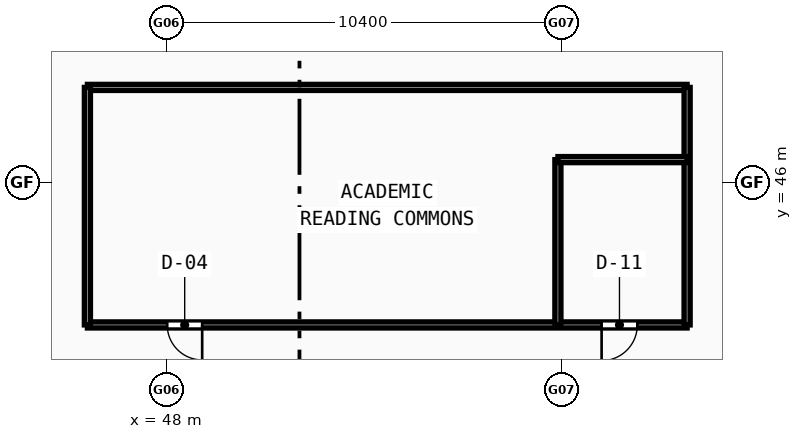
"""IFC4 building model, lengths in metres.
Left out: names, types, materials, properties, quantities, classifications, styles, units other than length and angle.
Written with IfcOpenShell. Run it as: python <this file> out.ifc"""

import sys

from ifc_helpers import new_model, si_unit, direction, frame, frame_2d, origin, place, context, subcontext, project, spatial, rectangle, extrude, source, transform, mapped, element, fill, save


model = new_model("IFC4")
c1 = context("Model", 3, precision=1e-05, world=origin(), true_north=direction((0.0, 1.0)))
c2 = subcontext(c1, "Body", "Model", "MODEL_VIEW")
j1 = project(units=[si_unit("LENGTHUNIT", "METRE"), si_unit("PLANEANGLEUNIT", "RADIAN")], contexts=[c1])
p1 = place(None, origin())
s1 = spatial("IfcSite", under=j1, at=p1, CompositionType="ELEMENT")
p2 = place(p1, origin())
s2 = spatial("IfcBuilding", under=s1, at=p2, CompositionType="ELEMENT")
p3 = place(p2, frame((0.0, 0.0, 34.03)))
s3 = spatial("IfcBuildingStorey", under=s2, at=p3, CompositionType="ELEMENT", Elevation=34.03)
p4 = place(p3, frame((45.92, 42.25, 0.0), z_axis=(0.0, 0.0, 1.0), x_axis=(1.0, 0.0, 0.0)))
e1 = element("IfcWall", 1, at=p4, inside=s3, PredefinedType="PARTITIONING", context=c2, shape_type="SweptSolid", body=[
    extrude(rectangle(XDim=15.78, YDim=0.16, at=frame_2d((7.89, 0.0))), origin(), (0.0, 0.0, 1.0), 2.67),
])
p5 = place(p4, frame((2.1, 0.0, 0.0)))
e2 = element("IfcOpeningElement", 2, at=p5, cuts=e1, PredefinedType="OPENING", context=c2, shape_type="SweptSolid", body=[
    extrude(rectangle(XDim=0.92, YDim=2.1, at=frame_2d((0.46, 1.05))), frame((0.0, 0.09, 0.0), z_axis=(0.0, -1.0, 0.0), x_axis=(1.0, 0.0, 0.0)), (0.0, 0.0, 1.0), 0.18),
])
p6 = place(p4, frame((13.53, 0.0, 0.0)))
e3 = element("IfcOpeningElement", 3, at=p6, cuts=e1, PredefinedType="OPENING", context=c2, shape_type="SweptSolid", body=[
    extrude(rectangle(XDim=0.94, YDim=2.1, at=frame_2d((0.47, 1.05))), frame((0.0, 0.09, 0.0), z_axis=(0.0, -1.0, 0.0), x_axis=(1.0, 0.0, 0.0)), (0.0, 0.0, 1.0), 0.18),
])
p7 = place(p3, frame((45.92, 48.5, 0.0), z_axis=(0.0, 0.0, 1.0), x_axis=(1.0, 0.0, 0.0)))
e4 = element("IfcWall", 4, at=p7, inside=s3, PredefinedType="PARTITIONING", context=c2, shape_type="SweptSolid", body=[
    extrude(rectangle(XDim=15.78, YDim=0.16, at=frame_2d((7.89, 0.0))), origin(), (0.0, 0.0, 1.0), 2.67),
])
p8 = place(p3, frame((45.92, 42.25, 0.0), z_axis=(0.0, 0.0, 1.0), x_axis=(0.0, 1.0, 0.0)))
e5 = element("IfcWall", 5, at=p8, inside=s3, PredefinedType="PARTITIONING", context=c2, shape_type="SweptSolid", body=[
    extrude(rectangle(XDim=6.25, YDim=0.16, at=frame_2d((3.125, 0.0))), origin(), (0.0, 0.0, 1.0), 3.37),
])
p9 = place(p3, frame((61.7, 42.25, 0.0), z_axis=(0.0, 0.0, 1.0), x_axis=(0.0, 1.0, 0.0)))
e6 = element("IfcWall", 6, at=p9, inside=s3, PredefinedType="PARTITIONING", context=c2, shape_type="SweptSolid", body=[
    extrude(rectangle(XDim=6.25, YDim=0.16, at=frame_2d((3.125, 0.0))), origin(), (0.0, 0.0, 1.0), 2.67),
])
p10 = place(p3, frame((58.3, 42.25, 0.0), z_axis=(0.0, 0.0, 1.0), x_axis=(0.0, 1.0, 0.0)))
e7 = element("IfcWall", 7, at=p10, inside=s3, PredefinedType="PARTITIONING", context=c2, shape_type="SweptSolid", body=[
    extrude(rectangle(XDim=4.35, YDim=0.16, at=frame_2d((2.175, 0.0))), origin(), (0.0, 0.0, 1.0), 2.67),
])
p11 = place(p3, frame((58.3, 46.6, 0.0), z_axis=(0.0, 0.0, 1.0), x_axis=(1.0, 0.0, 0.0)))
e8 = element("IfcWall", 8, at=p11, inside=s3, PredefinedType="PARTITIONING", context=c2, shape_type="SweptSolid", body=[
    extrude(rectangle(XDim=3.4, YDim=0.16, at=frame_2d((1.7, 0.0))), origin(), (0.0, 0.0, 1.0), 2.97),
])
m1 = source(origin(), c2, "Body", "SweptSolid", [
    extrude(rectangle(XDim=0.92, YDim=2.1, at=frame_2d((0.46, 1.05))), frame((0.0, 0.025, 0.0), z_axis=(0.0, -1.0, 0.0), x_axis=(1.0, 0.0, 0.0)), (0.0, 0.0, 1.0), 0.05),
])
p12 = place(p5, frame((0.92, 0.0, 0.0), z_axis=(0.0, 0.0, 1.0), x_axis=(-1.0, 0.0, 0.0)))
e9 = element("IfcDoor", 9, at=p12, inside=s3, OperationType="SINGLE_SWING_LEFT", PredefinedType="DOOR", context=c2, shape_type="MappedRepresentation", body=[
    mapped(m1, transform((0.0, 0.0, 0.0), scale=1.0)),
])
fill(e2, e9)
m2 = source(origin(), c2, "Body", "SweptSolid", [
    extrude(rectangle(XDim=0.94, YDim=2.1, at=frame_2d((0.47, 1.05))), frame((0.0, 0.025, 0.0), z_axis=(0.0, -1.0, 0.0), x_axis=(1.0, 0.0, 0.0)), (0.0, 0.0, 1.0), 0.05),
])
p13 = place(p6, frame((0.94, 0.0, 0.0), z_axis=(0.0, 0.0, 1.0), x_axis=(-1.0, 0.0, 0.0)))
e10 = element("IfcDoor", 10, at=p13, inside=s3, OperationType="SINGLE_SWING_RIGHT", PredefinedType="DOOR", context=c2, shape_type="MappedRepresentation", body=[
    mapped(m2, transform((0.0, 0.0, 0.0), scale=1.0)),
])
fill(e3, e10)
save(model, sys.argv[1])
